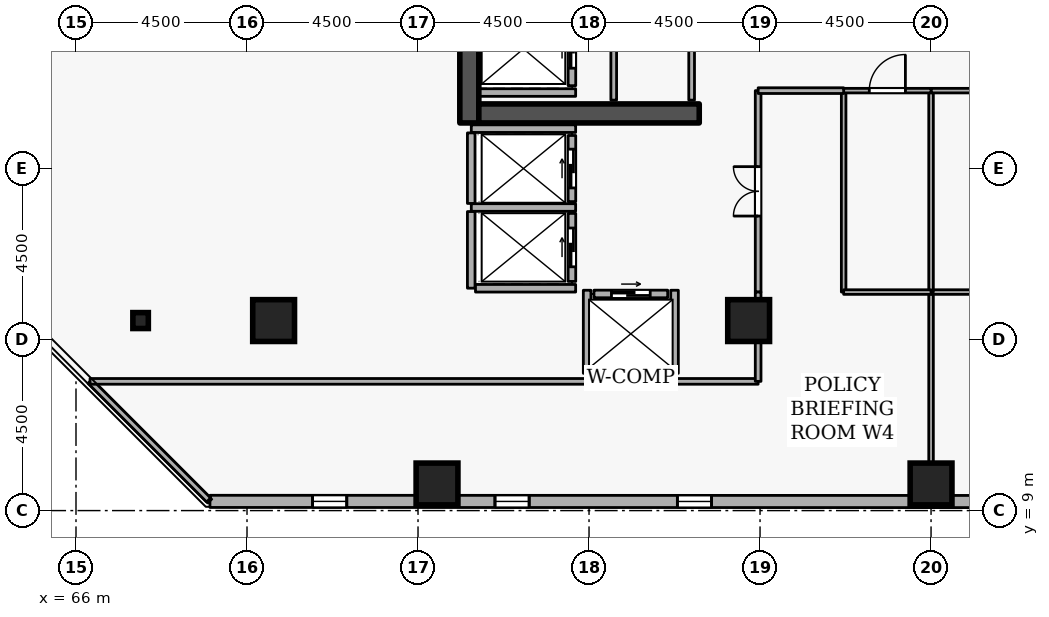
"""IFC4 building model, lengths in metres.
Left out: names, types, materials, properties, quantities, classifications, styles, units other than length and angle.
Written with IfcOpenShell. Run it as: python <this file> out.ifc"""

import sys

from ifc_helpers import new_model, si_unit, direction, frame, frame_2d, origin, origin_2d, place, context, subcontext, project, spatial, rectangle, i_section, extrude, element, fill, save


model = new_model("IFC4")
c1 = context("Model", 3, precision=1e-05, world=origin(), true_north=direction((0.0, 1.0)))
c2 = subcontext(c1, "Body", "Model", "MODEL_VIEW")
j1 = project(units=[si_unit("LENGTHUNIT", "METRE"), si_unit("PLANEANGLEUNIT", "RADIAN")], contexts=[c1])
p1 = place(None, origin())
s1 = spatial("IfcSite", under=j1, at=p1, CompositionType="ELEMENT")
p2 = place(p1, origin())
s2 = spatial("IfcBuilding", under=s1, at=p2, CompositionType="ELEMENT")
p3 = place(p2, frame((0.0, 0.0, 192.9)))
s3 = spatial("IfcBuildingStorey", under=s2, at=p3, CompositionType="ELEMENT", Elevation=192.9)
p4 = place(p3, frame((76.35, 19.2, 0.0), z_axis=(0.0, 0.0, 1.0), x_axis=(0.0, 1.0, 0.0)))
e1 = element("IfcWall", 1, at=p4, inside=s3, PredefinedType="SHEAR", context=c2, shape_type="SweptSolid", body=[
    extrude(rectangle(XDim=15.6, YDim=0.5, at=frame_2d((7.8, 0.0))), origin(), (0.0, 0.0, 1.0), 3.6),
])
p5 = place(p3, frame((76.6, 19.45, 0.0), z_axis=(0.0, 0.0, 1.0), x_axis=(1.0, 0.0, 0.0)))
e2 = element("IfcWall", 2, at=p5, inside=s3, PredefinedType="SHEAR", context=c2, shape_type="SweptSolid", body=[
    extrude(rectangle(XDim=5.8, YDim=0.5, at=frame_2d((2.9, 0.0))), origin(), (0.0, 0.0, 1.0), 3.6),
])
for number, where, z_axis, x_axis in (
    (3, (71.2, 14.0, 0.0), (0.0, 0.0, 1.0), (1.0, 0.0, 0.0)),
    (4, (88.5, 9.7, 0.0), (0.0, 0.0, 1.0), (1.0, 0.0, 0.0)),
    (5, (75.5, 9.7, 0.0), (0.0, 0.0, 1.0), (1.0, 0.0, 0.0)),
    (6, (83.7, 14.0, 0.0), (0.0, 0.0, 1.0), (1.0, 0.0, 0.0)),
):
    element("IfcColumn", number, at=place(p3, frame(where, z_axis=z_axis, x_axis=x_axis)), inside=s3, PredefinedType="COLUMN", context=c2, shape_type="SweptSolid", body=[
        extrude(rectangle(XDim=1.1, YDim=1.1, at=origin_2d()), origin(), (0.0, 0.0, 1.0), 3.6),
    ])
p6 = place(p3, frame((67.7, 14.0, 0.0), z_axis=(0.0, 0.0, 1.0), x_axis=(1.0, 0.0, 0.0)))
e7 = element("IfcColumn", 7, at=p6, inside=s3, PredefinedType="COLUMN", context=c2, shape_type="SweptSolid", body=[
    extrude(i_section(OverallWidth=0.407, OverallDepth=0.419, WebThickness=0.031, FlangeThickness=0.049, FilletRadius=0.015, at=origin_2d()), origin(), (0.0, 0.0, 1.0), 3.6),
])
p7 = place(p3, frame((69.525, 9.243, 0.0), z_axis=(0.0, 0.0, 1.0), x_axis=(0.99999997701, -0.000214431216, 0.0)))
e8 = element("IfcWall", 8, at=p7, inside=s3, PredefinedType="STANDARD", context=c2, shape_type="SweptSolid", body=[
    extrude(rectangle(XDim=34.156, YDim=0.32, at=frame_2d((17.078, 0.0))), origin(), (0.0, 0.0, 1.0), 2.7),
])
p8 = place(p7, frame((2.7, 0.0, 0.72)))
e9 = element("IfcOpeningElement", 9, at=p8, cuts=e8, PredefinedType="OPENING", context=c2, shape_type="SweptSolid", body=[
    extrude(rectangle(XDim=0.9, YDim=1.75, at=frame_2d((0.45, 0.875))), frame((0.0, 0.17, 0.0), z_axis=(0.0, -1.0, 0.0), x_axis=(1.0, 0.0, 0.0)), (0.0, 0.0, 1.0), 0.34),
])
p9 = place(p7, frame((7.5, 0.0, 0.72)))
e10 = element("IfcOpeningElement", 10, at=p9, cuts=e8, PredefinedType="OPENING", context=c2, shape_type="SweptSolid", body=[
    extrude(rectangle(XDim=0.9, YDim=1.75, at=frame_2d((0.45, 0.875))), frame((0.0, 0.17, 0.0), z_axis=(0.0, -1.0, 0.0), x_axis=(1.0, 0.0, 0.0)), (0.0, 0.0, 1.0), 0.34),
])
p10 = place(p7, frame((12.3, 0.0, 0.72)))
e11 = element("IfcOpeningElement", 11, at=p10, cuts=e8, PredefinedType="OPENING", context=c2, shape_type="SweptSolid", body=[
    extrude(rectangle(XDim=0.9, YDim=1.75, at=frame_2d((0.45, 0.875))), frame((0.0, 0.17, 0.0), z_axis=(0.0, -1.0, 0.0), x_axis=(1.0, 0.0, 0.0)), (0.0, 0.0, 1.0), 0.34),
])
p11 = place(p7, frame((21.9, 0.0, 0.72)))
e12 = element("IfcOpeningElement", 12, at=p11, cuts=e8, PredefinedType="OPENING", context=c2, shape_type="SweptSolid", body=[
    extrude(rectangle(XDim=0.9, YDim=1.75, at=frame_2d((0.45, 0.875))), frame((0.0, 0.17, 0.0), z_axis=(0.0, -1.0, 0.0), x_axis=(1.0, 0.0, 0.0)), (0.0, 0.0, 1.0), 0.34),
])
p12 = place(p7, frame((26.7, 0.0, 0.72)))
e13 = element("IfcOpeningElement", 13, at=p12, cuts=e8, PredefinedType="OPENING", context=c2, shape_type="SweptSolid", body=[
    extrude(rectangle(XDim=0.9, YDim=1.75, at=frame_2d((0.45, 0.875))), frame((0.0, 0.17, 0.0), z_axis=(0.0, -1.0, 0.0), x_axis=(1.0, 0.0, 0.0)), (0.0, 0.0, 1.0), 0.34),
])
p13 = place(p3, frame((79.05, 20.18, 0.0), z_axis=(0.0, 0.0, 1.0), x_axis=(0.0, 1.0, 0.0)))
e14 = element("IfcWall", 14, at=p13, inside=s3, PredefinedType="STANDARD", context=c2, shape_type="SweptSolid", body=[
    extrude(rectangle(XDim=1.94, YDim=0.2, at=frame_2d((0.97, 0.0))), origin(), (0.0, 0.0, 1.0), 3.34),
])
p14 = place(p13, frame((0.46, 0.0, 0.0)))
e15 = element("IfcOpeningElement", 15, at=p14, cuts=e14, PredefinedType="OPENING", context=c2, shape_type="SweptSolid", body=[
    extrude(rectangle(XDim=1.02, YDim=2.06, at=frame_2d((0.51, 1.03))), frame((0.0, 0.11, 0.0), z_axis=(0.0, -1.0, 0.0), x_axis=(1.0, 0.0, 0.0)), (0.0, 0.0, 1.0), 0.22),
])
p15 = place(p3, frame((79.05, 17.13, 0.0), z_axis=(0.0, 0.0, 1.0), x_axis=(0.0, 1.0, 0.0)))
e16 = element("IfcWall", 16, at=p15, inside=s3, PredefinedType="STANDARD", context=c2, shape_type="SweptSolid", body=[
    extrude(rectangle(XDim=1.74, YDim=0.2, at=frame_2d((0.87, 0.0))), origin(), (0.0, 0.0, 1.0), 3.34),
])
p16 = place(p15, frame((0.36, 0.0, 0.0)))
e17 = element("IfcOpeningElement", 17, at=p16, cuts=e16, PredefinedType="OPENING", context=c2, shape_type="SweptSolid", body=[
    extrude(rectangle(XDim=1.02, YDim=2.06, at=frame_2d((0.51, 1.03))), frame((0.0, 0.11, 0.0), z_axis=(0.0, -1.0, 0.0), x_axis=(1.0, 0.0, 0.0)), (0.0, 0.0, 1.0), 0.22),
])
p17 = place(p3, frame((79.05, 15.03, 0.0), z_axis=(0.0, 0.0, 1.0), x_axis=(0.0, 1.0, 0.0)))
e18 = element("IfcWall", 18, at=p17, inside=s3, PredefinedType="STANDARD", context=c2, shape_type="SweptSolid", body=[
    extrude(rectangle(XDim=1.79, YDim=0.2, at=frame_2d((0.895, 0.0))), origin(), (0.0, 0.0, 1.0), 3.34),
])
p18 = place(p17, frame((0.385, 0.0, 0.0)))
e19 = element("IfcOpeningElement", 19, at=p18, cuts=e18, PredefinedType="OPENING", context=c2, shape_type="SweptSolid", body=[
    extrude(rectangle(XDim=1.02, YDim=2.06, at=frame_2d((0.51, 1.03))), frame((0.0, 0.11, 0.0), z_axis=(0.0, -1.0, 0.0), x_axis=(1.0, 0.0, 0.0)), (0.0, 0.0, 1.0), 0.22),
])
p19 = place(p3, frame((79.63, 14.7, 0.0), z_axis=(0.0, 0.0, 1.0), x_axis=(1.0, 0.0, 0.0)))
e20 = element("IfcWall", 20, at=p19, inside=s3, PredefinedType="STANDARD", context=c2, shape_type="SweptSolid", body=[
    extrude(rectangle(XDim=1.94, YDim=0.2, at=frame_2d((0.97, 0.0))), origin(), (0.0, 0.0, 1.0), 3.34),
])
p20 = place(p19, frame((0.46, 0.0, 0.0)))
e21 = element("IfcOpeningElement", 21, at=p20, cuts=e20, PredefinedType="OPENING", context=c2, shape_type="SweptSolid", body=[
    extrude(rectangle(XDim=1.02, YDim=2.06, at=frame_2d((0.51, 1.03))), frame((0.0, 0.11, 0.0), z_axis=(0.0, -1.0, 0.0), x_axis=(1.0, 0.0, 0.0)), (0.0, 0.0, 1.0), 0.22),
])
p21 = place(p3, frame((76.612, 20.0, 0.0), z_axis=(0.0, 0.0, 1.0), x_axis=(1.0, 0.0, 0.0)))
e22 = element("IfcWall", 22, at=p21, inside=s3, PredefinedType="STANDARD", context=c2, shape_type="SweptSolid", body=[
    extrude(rectangle(XDim=2.536, YDim=0.2, at=frame_2d((1.268, 0.0))), origin(), (0.0, 0.0, 1.0), 3.34),
])
p22 = place(p3, frame((76.402, 19.05, 0.0), z_axis=(0.0, 0.0, 1.0), x_axis=(1.0, 0.0, 0.0)))
e23 = element("IfcWall", 23, at=p22, inside=s3, PredefinedType="STANDARD", context=c2, shape_type="SweptSolid", body=[
    extrude(rectangle(XDim=2.746, YDim=0.2, at=frame_2d((1.373, 0.0))), origin(), (0.0, 0.0, 1.0), 2.545),
])
p23 = place(p3, frame((76.402, 16.975, 0.0), z_axis=(0.0, 0.0, 1.0), x_axis=(1.0, 0.0, 0.0)))
e24 = element("IfcWall", 24, at=p23, inside=s3, PredefinedType="STANDARD", context=c2, shape_type="SweptSolid", body=[
    extrude(rectangle(XDim=2.746, YDim=0.2, at=frame_2d((1.373, 0.0))), origin(), (0.0, 0.0, 1.0), 3.34),
])
p24 = place(p3, frame((76.4, 14.852, 0.0), z_axis=(0.0, 0.0, 1.0), x_axis=(0.0, 1.0, 0.0)))
e25 = element("IfcWall", 25, at=p24, inside=s3, PredefinedType="STANDARD", context=c2, shape_type="SweptSolid", body=[
    extrude(rectangle(XDim=2.016, YDim=0.2, at=frame_2d((1.008, 0.0))), origin(), (0.0, 0.0, 1.0), 3.34),
])
p25 = place(p3, frame((76.4, 17.082, 0.0), z_axis=(0.0, 0.0, 1.0), x_axis=(0.0, 1.0, 0.0)))
e26 = element("IfcWall", 26, at=p25, inside=s3, PredefinedType="STANDARD", context=c2, shape_type="SweptSolid", body=[
    extrude(rectangle(XDim=1.856, YDim=0.2, at=frame_2d((0.928, 0.0))), origin(), (0.0, 0.0, 1.0), 3.34),
])
p26 = place(p3, frame((76.512, 14.85, 0.0), z_axis=(0.0, 0.0, 1.0), x_axis=(1.0, 0.0, 0.0)))
e27 = element("IfcWall", 27, at=p26, inside=s3, PredefinedType="STANDARD", context=c2, shape_type="SweptSolid", body=[
    extrude(rectangle(XDim=2.636, YDim=0.2, at=frame_2d((1.318, 0.0))), origin(), (0.0, 0.0, 1.0), 3.34),
])
p27 = place(p3, frame((79.452, 12.5, 0.0), z_axis=(0.0, 0.0, 1.0), x_axis=(1.0, 0.0, 0.0)))
e28 = element("IfcWall", 28, at=p27, inside=s3, PredefinedType="STANDARD", context=c2, shape_type="SweptSolid", body=[
    extrude(rectangle(XDim=2.296, YDim=0.2, at=frame_2d((1.148, 0.0))), origin(), (0.0, 0.0, 1.0), 3.34),
])
for number, where, z_axis, x_axis in (
    (29, (81.75, 12.612, 0.0), (0.0, 0.0, 1.0), (0.0, 1.0, 0.0)),
    (30, (79.45, 12.612, 0.0), (0.0, 0.0, 1.0), (0.0, 1.0, 0.0)),
):
    element("IfcWall", number, at=place(p3, frame(where, z_axis=z_axis, x_axis=x_axis)), inside=s3, PredefinedType="STANDARD", context=c2, shape_type="SweptSolid", body=[
        extrude(rectangle(XDim=2.186, YDim=0.2, at=frame_2d((1.093, 0.0))), origin(), (0.0, 0.0, 1.0), 3.34),
    ])
p28 = place(p3, frame((80.15, 19.8, 0.0), z_axis=(0.0, 0.0, 1.0), x_axis=(0.0, 1.0, 0.0)))
e31 = element("IfcWall", 31, at=p28, inside=s3, PredefinedType="PARTITIONING", context=c2, shape_type="SweptSolid", body=[
    extrude(rectangle(XDim=4.25, YDim=0.15, at=frame_2d((2.125, 0.0))), origin(), (0.0, 0.0, 1.0), 3.34),
])
p29 = place(p3, frame((82.2, 24.05, 0.0), z_axis=(0.0, 0.0, 1.0), x_axis=(0.0, -1.0, 0.0)))
e32 = element("IfcWall", 32, at=p29, inside=s3, PredefinedType="PARTITIONING", context=c2, shape_type="SweptSolid", body=[
    extrude(rectangle(XDim=4.25, YDim=0.15, at=frame_2d((2.125, 0.0))), origin(), (0.0, 0.0, 1.0), 3.34),
])
p30 = place(p29, frame((1.665, 0.0, 0.0)))
e33 = element("IfcOpeningElement", 33, at=p30, cuts=e32, PredefinedType="OPENING", context=c2, shape_type="SweptSolid", body=[
    extrude(rectangle(XDim=0.92, YDim=2.08, at=frame_2d((0.46, 1.04))), frame((0.0, 0.085, 0.0), z_axis=(0.0, -1.0, 0.0), x_axis=(1.0, 0.0, 0.0)), (0.0, 0.0, 1.0), 0.17),
])
p31 = place(p3, frame((88.5, 9.7, 0.0), z_axis=(0.0, 0.0, 1.0), x_axis=(0.0, 1.0, 0.0)))
e34 = element("IfcWall", 34, at=p31, inside=s3, PredefinedType="PARTITIONING", context=c2, shape_type="SweptSolid", body=[
    extrude(rectangle(XDim=5.05, YDim=0.12, at=frame_2d((2.525, 0.0))), origin(), (0.0, 0.0, 1.0), 2.882),
])
p32 = place(p3, frame((88.5, 14.75, 0.0), z_axis=(0.0, 0.0, 1.0), x_axis=(1.0, 0.0, 0.0)))
e35 = element("IfcWall", 35, at=p32, inside=s3, PredefinedType="PARTITIONING", context=c2, shape_type="SweptSolid", body=[
    extrude(rectangle(XDim=4.55, YDim=0.12, at=frame_2d((2.275, 0.0))), origin(), (0.0, 0.0, 1.0), 3.34),
])
p33 = place(p3, frame((88.5, 14.75, 0.0), z_axis=(0.0, 0.0, 1.0), x_axis=(0.0, 1.0, 0.0)))
e36 = element("IfcWall", 36, at=p33, inside=s3, PredefinedType="PARTITIONING", context=c2, shape_type="SweptSolid", body=[
    extrude(rectangle(XDim=5.3, YDim=0.12, at=frame_2d((2.65, 0.0))), origin(), (0.0, 0.0, 1.0), 2.882),
])
p34 = place(p3, frame((88.5, 20.05, 0.0), z_axis=(0.0, 0.0, 1.0), x_axis=(1.0, 0.0, 0.0)))
e37 = element("IfcWall", 37, at=p34, inside=s3, PredefinedType="PARTITIONING", context=c2, shape_type="SweptSolid", body=[
    extrude(rectangle(XDim=4.55, YDim=0.12, at=frame_2d((2.275, 0.0))), origin(), (0.0, 0.0, 1.0), 3.34),
])
p35 = place(p3, frame((86.2, 14.75, 0.0), z_axis=(0.0, 0.0, 1.0), x_axis=(0.0, 1.0, 0.0)))
e38 = element("IfcWall", 38, at=p35, inside=s3, PredefinedType="PARTITIONING", context=c2, shape_type="SweptSolid", body=[
    extrude(rectangle(XDim=5.3, YDim=0.12, at=frame_2d((2.65, 0.0))), origin(), (0.0, 0.0, 1.0), 3.34),
])
p36 = place(p3, frame((86.2, 20.05, 0.0), z_axis=(0.0, 0.0, 1.0), x_axis=(1.0, 0.0, 0.0)))
e39 = element("IfcWall", 39, at=p36, inside=s3, PredefinedType="PARTITIONING", context=c2, shape_type="SweptSolid", body=[
    extrude(rectangle(XDim=2.3, YDim=0.12, at=frame_2d((1.15, 0.0))), origin(), (0.0, 0.0, 1.0), 3.34),
])
p37 = place(p36, frame((0.675, 0.0, 0.0)))
e40 = element("IfcOpeningElement", 40, at=p37, cuts=e39, PredefinedType="OPENING", context=c2, shape_type="SweptSolid", body=[
    extrude(rectangle(XDim=0.95, YDim=2.1, at=frame_2d((0.475, 1.05))), frame((0.0, 0.07, 0.0), z_axis=(0.0, -1.0, 0.0), x_axis=(1.0, 0.0, 0.0)), (0.0, 0.0, 1.0), 0.14),
])
p38 = place(p3, frame((88.5, 14.75, 0.0), z_axis=(0.0, 0.0, 1.0), x_axis=(-1.0, 0.0, 0.0)))
e41 = element("IfcWall", 41, at=p38, inside=s3, PredefinedType="PARTITIONING", context=c2, shape_type="SweptSolid", body=[
    extrude(rectangle(XDim=2.3, YDim=0.12, at=frame_2d((1.15, 0.0))), origin(), (0.0, 0.0, 1.0), 3.34),
])
p39 = place(p3, frame((83.95, 14.75, 0.0), z_axis=(0.0, 0.0, 1.0), x_axis=(0.0, 1.0, 0.0)))
e42 = element("IfcWall", 42, at=p39, inside=s3, PredefinedType="PARTITIONING", context=c2, shape_type="SweptSolid", body=[
    extrude(rectangle(XDim=5.3, YDim=0.15, at=frame_2d((2.65, 0.0))), origin(), (0.0, 0.0, 1.0), 3.34),
])
p40 = place(p39, frame((2.0, 0.0, 0.0)))
e43 = element("IfcOpeningElement", 43, at=p40, cuts=e42, PredefinedType="OPENING", context=c2, shape_type="SweptSolid", body=[
    extrude(rectangle(XDim=1.3, YDim=2.12, at=frame_2d((0.65, 1.06))), frame((0.0, 0.085, 0.0), z_axis=(0.0, -1.0, 0.0), x_axis=(1.0, 0.0, 0.0)), (0.0, 0.0, 1.0), 0.17),
])
p41 = place(p3, frame((83.95, 20.05, 0.0), z_axis=(0.0, 0.0, 1.0), x_axis=(1.0, 0.0, 0.0)))
e44 = element("IfcWall", 44, at=p41, inside=s3, PredefinedType="PARTITIONING", context=c2, shape_type="SweptSolid", body=[
    extrude(rectangle(XDim=2.25, YDim=0.15, at=frame_2d((1.125, 0.0))), origin(), (0.0, 0.0, 1.0), 3.34),
])
p42 = place(p3, frame((69.49, 9.28, 0.0), z_axis=(0.0, 0.0, 1.0), x_axis=(-0.707106781187, 0.707106781187, 0.0)))
e45 = element("IfcWall", 45, at=p42, inside=s3, PredefinedType="PARTITIONING", context=c2, shape_type="SweptSolid", body=[
    extrude(rectangle(XDim=4.412, YDim=0.15, at=frame_2d((2.206, 0.0))), origin(), (0.0, 0.0, 1.0), 3.34),
])
p43 = place(p3, frame((66.37, 12.4, 0.0), z_axis=(0.0, 0.0, 1.0), x_axis=(1.0, 0.0, 0.0)))
e46 = element("IfcWall", 46, at=p43, inside=s3, PredefinedType="PARTITIONING", context=c2, shape_type="SweptSolid", body=[
    extrude(rectangle(XDim=13.082, YDim=0.15, at=frame_2d((6.541, 0.0))), origin(), (0.0, 0.0, 1.0), 3.34),
])
p44 = place(p3, frame((81.748, 12.4, 0.0), z_axis=(0.0, 0.0, 1.0), x_axis=(1.0, 0.0, 0.0)))
e47 = element("IfcWall", 47, at=p44, inside=s3, PredefinedType="PARTITIONING", context=c2, shape_type="SweptSolid", body=[
    extrude(rectangle(XDim=2.202, YDim=0.15, at=frame_2d((1.101, 0.0))), origin(), (0.0, 0.0, 1.0), 3.34),
])
p45 = place(p3, frame((83.95, 12.4, 0.0), z_axis=(0.0, 0.0, 1.0), x_axis=(0.0, 1.0, 0.0)))
e48 = element("IfcWall", 48, at=p45, inside=s3, PredefinedType="PARTITIONING", context=c2, shape_type="SweptSolid", body=[
    extrude(rectangle(XDim=2.35, YDim=0.15, at=frame_2d((1.175, 0.0))), origin(), (0.0, 0.0, 1.0), 3.34),
])
p46 = place(p8, origin())
e49 = element("IfcWindow", 49, at=p46, inside=s3, PartitioningType="SINGLE_PANEL", PredefinedType="WINDOW", context=c2, shape_type="SweptSolid", body=[
    extrude(rectangle(XDim=0.9, YDim=1.75, at=frame_2d((0.45, 0.875))), frame((0.0, 0.03, 0.0), z_axis=(0.0, -1.0, 0.0), x_axis=(1.0, 0.0, 0.0)), (0.0, 0.0, 1.0), 0.06),
])
fill(e9, e49)
p47 = place(p9, origin())
e50 = element("IfcWindow", 50, at=p47, inside=s3, PartitioningType="SINGLE_PANEL", PredefinedType="WINDOW", context=c2, shape_type="SweptSolid", body=[
    extrude(rectangle(XDim=0.9, YDim=1.75, at=frame_2d((0.45, 0.875))), frame((0.0, 0.03, 0.0), z_axis=(0.0, -1.0, 0.0), x_axis=(1.0, 0.0, 0.0)), (0.0, 0.0, 1.0), 0.06),
])
fill(e10, e50)
p48 = place(p10, origin())
e51 = element("IfcWindow", 51, at=p48, inside=s3, PartitioningType="SINGLE_PANEL", PredefinedType="WINDOW", context=c2, shape_type="SweptSolid", body=[
    extrude(rectangle(XDim=0.9, YDim=1.75, at=frame_2d((0.45, 0.875))), frame((0.0, 0.03, 0.0), z_axis=(0.0, -1.0, 0.0), x_axis=(1.0, 0.0, 0.0)), (0.0, 0.0, 1.0), 0.06),
])
fill(e11, e51)
p49 = place(p14, origin())
e52 = element("IfcDoor", 52, at=p49, inside=s3, OperationType="SLIDING_TO_LEFT", PredefinedType="DOOR", context=c2, shape_type="SweptSolid", body=[
    extrude(rectangle(XDim=1.02, YDim=2.06, at=frame_2d((0.51, 1.03))), frame((0.0, 0.025, 0.0), z_axis=(0.0, -1.0, 0.0), x_axis=(1.0, 0.0, 0.0)), (0.0, 0.0, 1.0), 0.05),
])
fill(e15, e52)
p50 = place(p16, origin())
e53 = element("IfcDoor", 53, at=p50, inside=s3, OperationType="SLIDING_TO_LEFT", PredefinedType="DOOR", context=c2, shape_type="SweptSolid", body=[
    extrude(rectangle(XDim=1.02, YDim=2.06, at=frame_2d((0.51, 1.03))), frame((0.0, 0.025, 0.0), z_axis=(0.0, -1.0, 0.0), x_axis=(1.0, 0.0, 0.0)), (0.0, 0.0, 1.0), 0.05),
])
fill(e17, e53)
p51 = place(p18, origin())
e54 = element("IfcDoor", 54, at=p51, inside=s3, OperationType="SLIDING_TO_LEFT", PredefinedType="DOOR", context=c2, shape_type="SweptSolid", body=[
    extrude(rectangle(XDim=1.02, YDim=2.06, at=frame_2d((0.51, 1.03))), frame((0.0, 0.025, 0.0), z_axis=(0.0, -1.0, 0.0), x_axis=(1.0, 0.0, 0.0)), (0.0, 0.0, 1.0), 0.05),
])
fill(e19, e54)
p52 = place(p20, origin())
e55 = element("IfcDoor", 55, at=p52, inside=s3, OperationType="SLIDING_TO_LEFT", PredefinedType="DOOR", context=c2, shape_type="SweptSolid", body=[
    extrude(rectangle(XDim=1.02, YDim=2.06, at=frame_2d((0.51, 1.03))), frame((0.0, 0.025, 0.0), z_axis=(0.0, -1.0, 0.0), x_axis=(1.0, 0.0, 0.0)), (0.0, 0.0, 1.0), 0.05),
])
fill(e21, e55)
p53 = place(p37, origin())
e56 = element("IfcDoor", 56, at=p53, inside=s3, OperationType="SINGLE_SWING_RIGHT", PredefinedType="DOOR", context=c2, shape_type="SweptSolid", body=[
    extrude(rectangle(XDim=0.95, YDim=2.1, at=frame_2d((0.475, 1.05))), frame((0.0, 0.025, 0.0), z_axis=(0.0, -1.0, 0.0), x_axis=(1.0, 0.0, 0.0)), (0.0, 0.0, 1.0), 0.05),
])
fill(e40, e56)
p54 = place(p40, origin())
e57 = element("IfcDoor", 57, at=p54, inside=s3, OperationType="DOUBLE_DOOR_SINGLE_SWING", PredefinedType="DOOR", context=c2, shape_type="SweptSolid", body=[
    extrude(rectangle(XDim=1.3, YDim=2.12, at=frame_2d((0.65, 1.06))), frame((0.0, 0.025, 0.0), z_axis=(0.0, -1.0, 0.0), x_axis=(1.0, 0.0, 0.0)), (0.0, 0.0, 1.0), 0.05),
])
fill(e43, e57)
save(model, sys.argv[1])
